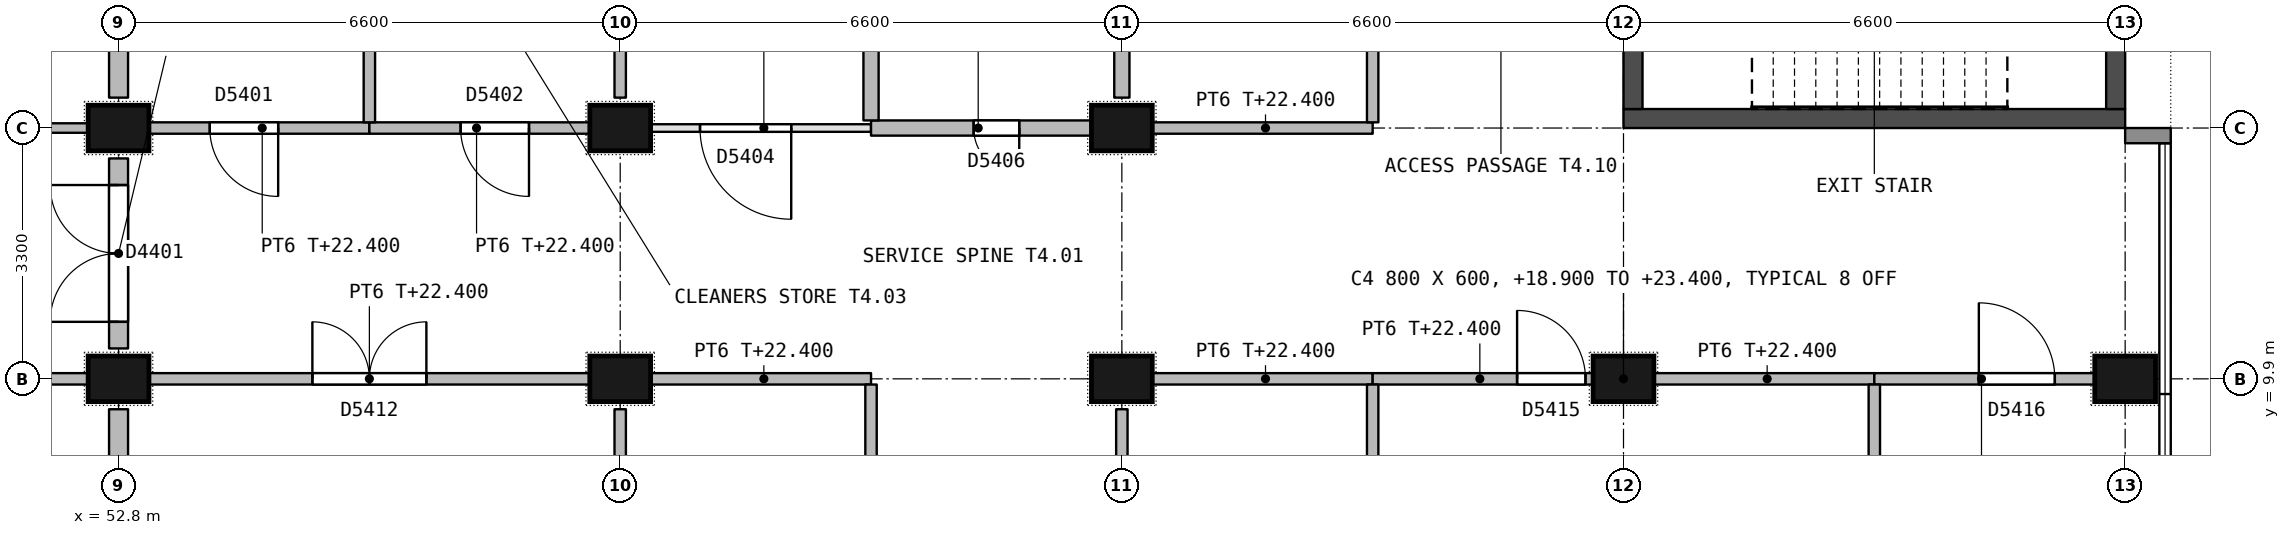
"""IFC4 building model, lengths in metres.
Left out: names, types, materials, properties, quantities, classifications, styles, units other than length and angle.
Written with IfcOpenShell. Run it as: python <this file> out.ifc"""

import sys

from ifc_helpers import new_model, si_unit, direction, frame, frame_2d, origin, origin_2d, place, context, subcontext, project, spatial, rectangle, extrude, element, fill, save


model = new_model("IFC4")
c1 = context("Model", 3, precision=1e-05, world=origin(), true_north=direction((0.0, 1.0)))
c2 = subcontext(c1, "Body", "Model", "MODEL_VIEW")
j1 = project(units=[si_unit("LENGTHUNIT", "METRE"), si_unit("PLANEANGLEUNIT", "RADIAN")], contexts=[c1])
p1 = place(None, origin())
s1 = spatial("IfcSite", under=j1, at=p1, CompositionType="ELEMENT")
p2 = place(p1, origin())
s2 = spatial("IfcBuilding", under=s1, at=p2, CompositionType="ELEMENT")
p3 = place(p2, frame((0.0, 0.0, 18.9)))
s3 = spatial("IfcBuildingStorey", under=s2, at=p3, CompositionType="ELEMENT", Elevation=18.9)
for number, where, z_axis, x_axis in (
    (1, (52.8, 9.9, 0.0), (0.0, 0.0, 1.0), (1.0, 0.0, 0.0)),
    (2, (52.8, 13.2, 0.0), (0.0, 0.0, 1.0), (1.0, 0.0, 0.0)),
    (3, (59.4, 9.9, 0.0), (0.0, 0.0, 1.0), (1.0, 0.0, 0.0)),
    (4, (59.4, 13.2, 0.0), (0.0, 0.0, 1.0), (1.0, 0.0, 0.0)),
    (5, (66.0, 9.9, 0.0), (0.0, 0.0, 1.0), (1.0, 0.0, 0.0)),
    (6, (66.0, 13.2, 0.0), (0.0, 0.0, 1.0), (1.0, 0.0, 0.0)),
    (7, (72.6, 9.9, 0.0), (0.0, 0.0, 1.0), (1.0, 0.0, 0.0)),
    (8, (79.2, 9.9, 0.0), (0.0, 0.0, 1.0), (1.0, 0.0, 0.0)),
):
    element("IfcColumn", number, at=place(p3, frame(where, z_axis=z_axis, x_axis=x_axis)), inside=s3, PredefinedType="COLUMN", context=c2, shape_type="SweptSolid", body=[
        extrude(rectangle(XDim=0.8, YDim=0.6, at=origin_2d()), origin(), (0.0, 0.0, 1.0), 4.5),
    ])
p4 = place(p3, frame((72.6, 13.325, 0.0), z_axis=(0.0, 0.0, 1.0), x_axis=(1.0, 0.0, 0.0)))
e9 = element("IfcWall", 9, at=p4, inside=s3, PredefinedType="SHEAR", context=c2, shape_type="SweptSolid", body=[
    extrude(rectangle(XDim=6.6, YDim=0.25, at=frame_2d((3.3, 0.0))), origin(), (0.0, 0.0, 1.0), 4.2),
])
p5 = place(p3, frame((72.725, 13.45, 0.0), z_axis=(0.0, 0.0, 1.0), x_axis=(0.0, 1.0, 0.0)))
e10 = element("IfcWall", 10, at=p5, inside=s3, PredefinedType="SHEAR", context=c2, shape_type="SweptSolid", body=[
    extrude(rectangle(XDim=9.4, YDim=0.25, at=frame_2d((4.7, 0.0))), origin(), (0.0, 0.0, 1.0), 4.2),
])
p6 = place(p5, frame((4.125, 0.0, 0.0)))
e11 = element("IfcOpeningElement", 11, at=p6, cuts=e10, PredefinedType="OPENING", context=c2, shape_type="SweptSolid", body=[
    extrude(rectangle(XDim=1.2, YDim=2.1, at=frame_2d((0.6, 1.05))), frame((0.0, 0.135, 0.0), z_axis=(0.0, -1.0, 0.0), x_axis=(1.0, 0.0, 0.0)), (0.0, 0.0, 1.0), 0.27),
])
p7 = place(p3, frame((79.075, 13.45, 0.0), z_axis=(0.0, 0.0, 1.0), x_axis=(0.0, 1.0, 0.0)))
e12 = element("IfcWall", 12, at=p7, inside=s3, PredefinedType="SHEAR", context=c2, shape_type="SweptSolid", body=[
    extrude(rectangle(XDim=9.4, YDim=0.25, at=frame_2d((4.7, 0.0))), origin(), (0.0, 0.0, 1.0), 4.2),
])
p8 = place(p7, frame((0.95, 0.0, 0.7)))
e13 = element("IfcOpeningElement", 13, at=p8, cuts=e12, PredefinedType="OPENING", context=c2, shape_type="SweptSolid", body=[
    extrude(rectangle(XDim=1.2, YDim=1.8, at=frame_2d((0.6, 0.9))), frame((0.0, 0.135, 0.0), z_axis=(0.0, -1.0, 0.0), x_axis=(1.0, 0.0, 0.0)), (0.0, 0.0, 1.0), 0.27),
])
p9 = place(p3, frame((79.2, 13.1, 0.0), z_axis=(0.0, 0.0, 1.0), x_axis=(1.0, 0.0, 0.0)))
e14 = element("IfcWall", 14, at=p9, inside=s3, PredefinedType="STANDARD", context=c2, shape_type="SweptSolid", body=[
    extrude(rectangle(XDim=0.6, YDim=0.2, at=frame_2d((0.3, 0.0))), origin(), (0.0, 0.0, 1.0), 3.5),
])
p10 = place(p3, frame((49.5, 13.2, 0.0), z_axis=(0.0, 0.0, 1.0), x_axis=(1.0, 0.0, 0.0)))
e15 = element("IfcWall", 15, at=p10, inside=s3, PredefinedType="PARTITIONING", context=c2, shape_type="SweptSolid", body=[
    extrude(rectangle(XDim=2.9, YDim=0.125, at=frame_2d((1.45, 0.0))), origin(), (0.0, 0.0, 1.0), 3.5),
])
p11 = place(p10, frame((1.2, 0.0, 0.0)))
e16 = element("IfcOpeningElement", 16, at=p11, cuts=e15, PredefinedType="OPENING", context=c2, shape_type="SweptSolid", body=[
    extrude(rectangle(XDim=0.9, YDim=2.1, at=frame_2d((0.45, 1.05))), frame((0.0, 0.073, 0.0), z_axis=(0.0, -1.0, 0.0), x_axis=(1.0, 0.0, 0.0)), (0.0, 0.0, 1.0), 0.145),
])
p12 = place(p3, frame((46.55, 9.9, 0.0), z_axis=(0.0, 0.0, 1.0), x_axis=(1.0, 0.0, 0.0)))
e17 = element("IfcWall", 17, at=p12, inside=s3, PredefinedType="PARTITIONING", context=c2, shape_type="SweptSolid", body=[
    extrude(rectangle(XDim=5.85, YDim=0.15, at=frame_2d((2.925, 0.0))), origin(), (0.0, 0.0, 1.0), 3.5),
])
p13 = place(p12, frame((2.2, 0.0, 0.0)))
e18 = element("IfcOpeningElement", 18, at=p13, cuts=e17, PredefinedType="OPENING", context=c2, shape_type="SweptSolid", body=[
    extrude(rectangle(XDim=1.5, YDim=2.1, at=frame_2d((0.75, 1.05))), frame((0.0, 0.085, 0.0), z_axis=(0.0, -1.0, 0.0), x_axis=(1.0, 0.0, 0.0)), (0.0, 0.0, 1.0), 0.17),
])
p14 = place(p3, frame((52.8, 10.3, 0.0), z_axis=(0.0, 0.0, 1.0), x_axis=(0.0, 1.0, 0.0)))
e19 = element("IfcWall", 19, at=p14, inside=s3, PredefinedType="PARTITIONING", context=c2, shape_type="SweptSolid", body=[
    extrude(rectangle(XDim=2.5, YDim=0.25, at=frame_2d((1.25, 0.0))), origin(), (0.0, 0.0, 1.0), 3.6),
])
p15 = place(p14, frame((0.35, 0.0, 0.0)))
e20 = element("IfcOpeningElement", 20, at=p15, cuts=e19, PredefinedType="OPENING", context=c2, shape_type="SweptSolid", body=[
    extrude(rectangle(XDim=1.8, YDim=2.1, at=frame_2d((0.9, 1.05))), frame((0.0, 0.135, 0.0), z_axis=(0.0, -1.0, 0.0), x_axis=(1.0, 0.0, 0.0)), (0.0, 0.0, 1.0), 0.27),
])
p16 = place(p3, frame((52.8, 13.6, 0.0), z_axis=(0.0, 0.0, 1.0), x_axis=(0.0, 1.0, 0.0)))
e21 = element("IfcWall", 21, at=p16, inside=s3, PredefinedType="PARTITIONING", context=c2, shape_type="SweptSolid", body=[
    extrude(rectangle(XDim=9.1, YDim=0.25, at=frame_2d((4.55, 0.0))), origin(), (0.0, 0.0, 1.0), 3.3),
])
p17 = place(p3, frame((52.8, 3.9, 0.0), z_axis=(0.0, 0.0, 1.0), x_axis=(0.0, 1.0, 0.0)))
e22 = element("IfcWall", 22, at=p17, inside=s3, PredefinedType="PARTITIONING", context=c2, shape_type="SweptSolid", body=[
    extrude(rectangle(XDim=5.6, YDim=0.25, at=frame_2d((2.8, 0.0))), origin(), (0.0, 0.0, 1.0), 3.3),
])
p18 = place(p3, frame((56.1, 13.2, 0.0), z_axis=(0.0, 0.0, 1.0), x_axis=(-1.0, 0.0, 0.0)))
e23 = element("IfcWall", 23, at=p18, inside=s3, PredefinedType="PARTITIONING", context=c2, shape_type="SweptSolid", body=[
    extrude(rectangle(XDim=2.9, YDim=0.15, at=frame_2d((1.45, 0.0))), origin(), (0.0, 0.0, 1.0), 3.5),
])
p19 = place(p18, frame((1.2, 0.0, 0.0)))
e24 = element("IfcOpeningElement", 24, at=p19, cuts=e23, PredefinedType="OPENING", context=c2, shape_type="SweptSolid", body=[
    extrude(rectangle(XDim=0.9, YDim=2.1, at=frame_2d((0.45, 1.05))), frame((0.0, 0.085, 0.0), z_axis=(0.0, -1.0, 0.0), x_axis=(1.0, 0.0, 0.0)), (0.0, 0.0, 1.0), 0.17),
])
p20 = place(p3, frame((59.0, 13.2, 0.0), z_axis=(0.0, 0.0, 1.0), x_axis=(-1.0, 0.0, 0.0)))
e25 = element("IfcWall", 25, at=p20, inside=s3, PredefinedType="PARTITIONING", context=c2, shape_type="SweptSolid", body=[
    extrude(rectangle(XDim=2.9, YDim=0.15, at=frame_2d((1.45, 0.0))), origin(), (0.0, 0.0, 1.0), 3.5),
])
p21 = place(p20, frame((0.8, 0.0, 0.0)))
e26 = element("IfcOpeningElement", 26, at=p21, cuts=e25, PredefinedType="OPENING", context=c2, shape_type="SweptSolid", body=[
    extrude(rectangle(XDim=0.9, YDim=2.1, at=frame_2d((0.45, 1.05))), frame((0.0, 0.085, 0.0), z_axis=(0.0, -1.0, 0.0), x_axis=(1.0, 0.0, 0.0)), (0.0, 0.0, 1.0), 0.17),
])
p22 = place(p3, frame((59.8, 13.2, 0.0), z_axis=(0.0, 0.0, 1.0), x_axis=(1.0, 0.0, 0.0)))
e27 = element("IfcWall", 27, at=p22, inside=s3, PredefinedType="PARTITIONING", context=c2, shape_type="SweptSolid", body=[
    extrude(rectangle(XDim=2.9, YDim=0.1, at=frame_2d((1.45, 0.0))), origin(), (0.0, 0.0, 1.0), 3.5),
])
p23 = place(p22, frame((0.65, 0.0, 0.0)))
e28 = element("IfcOpeningElement", 28, at=p23, cuts=e27, PredefinedType="OPENING", context=c2, shape_type="SweptSolid", body=[
    extrude(rectangle(XDim=1.2, YDim=2.1, at=frame_2d((0.6, 1.05))), frame((0.0, 0.06, 0.0), z_axis=(0.0, -1.0, 0.0), x_axis=(1.0, 0.0, 0.0)), (0.0, 0.0, 1.0), 0.12),
])
p24 = place(p3, frame((62.7, 13.2, 0.0), z_axis=(0.0, 0.0, 1.0), x_axis=(1.0, 0.0, 0.0)))
e29 = element("IfcWall", 29, at=p24, inside=s3, PredefinedType="PARTITIONING", context=c2, shape_type="SweptSolid", body=[
    extrude(rectangle(XDim=2.9, YDim=0.2, at=frame_2d((1.45, 0.0))), origin(), (0.0, 0.0, 1.0), 3.5),
])
p25 = place(p24, frame((1.35, 0.0, 0.0)))
e30 = element("IfcOpeningElement", 30, at=p25, cuts=e29, PredefinedType="OPENING", context=c2, shape_type="SweptSolid", body=[
    extrude(rectangle(XDim=0.6, YDim=2.1, at=frame_2d((0.3, 1.05))), frame((0.0, 0.11, 0.0), z_axis=(0.0, -1.0, 0.0), x_axis=(1.0, 0.0, 0.0)), (0.0, 0.0, 1.0), 0.22),
])
p26 = place(p3, frame((69.3, 13.2, 0.0), z_axis=(0.0, 0.0, 1.0), x_axis=(-1.0, 0.0, 0.0)))
e31 = element("IfcWall", 31, at=p26, inside=s3, PredefinedType="PARTITIONING", context=c2, shape_type="SweptSolid", body=[
    extrude(rectangle(XDim=2.9, YDim=0.15, at=frame_2d((1.45, 0.0))), origin(), (0.0, 0.0, 1.0), 3.5),
])
p27 = place(p3, frame((53.2, 9.9, 0.0), z_axis=(0.0, 0.0, 1.0), x_axis=(1.0, 0.0, 0.0)))
e32 = element("IfcWall", 32, at=p27, inside=s3, PredefinedType="PARTITIONING", context=c2, shape_type="SweptSolid", body=[
    extrude(rectangle(XDim=5.8, YDim=0.15, at=frame_2d((2.9, 0.0))), origin(), (0.0, 0.0, 1.0), 3.5),
])
p28 = place(p27, frame((2.15, 0.0, 0.0)))
e33 = element("IfcOpeningElement", 33, at=p28, cuts=e32, PredefinedType="OPENING", context=c2, shape_type="SweptSolid", body=[
    extrude(rectangle(XDim=1.5, YDim=2.1, at=frame_2d((0.75, 1.05))), frame((0.0, 0.085, 0.0), z_axis=(0.0, -1.0, 0.0), x_axis=(1.0, 0.0, 0.0)), (0.0, 0.0, 1.0), 0.17),
])
p29 = place(p3, frame((59.8, 9.9, 0.0), z_axis=(0.0, 0.0, 1.0), x_axis=(1.0, 0.0, 0.0)))
e34 = element("IfcWall", 34, at=p29, inside=s3, PredefinedType="PARTITIONING", context=c2, shape_type="SweptSolid", body=[
    extrude(rectangle(XDim=2.9, YDim=0.15, at=frame_2d((1.45, 0.0))), origin(), (0.0, 0.0, 1.0), 3.5),
])
p30 = place(p3, frame((66.4, 9.9, 0.0), z_axis=(0.0, 0.0, 1.0), x_axis=(1.0, 0.0, 0.0)))
e35 = element("IfcWall", 35, at=p30, inside=s3, PredefinedType="PARTITIONING", context=c2, shape_type="SweptSolid", body=[
    extrude(rectangle(XDim=2.9, YDim=0.15, at=frame_2d((1.45, 0.0))), origin(), (0.0, 0.0, 1.0), 3.5),
])
p31 = place(p3, frame((69.3, 9.9, 0.0), z_axis=(0.0, 0.0, 1.0), x_axis=(1.0, 0.0, 0.0)))
e36 = element("IfcWall", 36, at=p31, inside=s3, PredefinedType="PARTITIONING", context=c2, shape_type="SweptSolid", body=[
    extrude(rectangle(XDim=2.9, YDim=0.15, at=frame_2d((1.45, 0.0))), origin(), (0.0, 0.0, 1.0), 3.5),
])
p32 = place(p31, frame((1.9, 0.0, 0.0)))
e37 = element("IfcOpeningElement", 37, at=p32, cuts=e36, PredefinedType="OPENING", context=c2, shape_type="SweptSolid", body=[
    extrude(rectangle(XDim=0.9, YDim=2.1, at=frame_2d((0.45, 1.05))), frame((0.0, 0.085, 0.0), z_axis=(0.0, -1.0, 0.0), x_axis=(1.0, 0.0, 0.0)), (0.0, 0.0, 1.0), 0.17),
])
p33 = place(p3, frame((73.0, 9.9, 0.0), z_axis=(0.0, 0.0, 1.0), x_axis=(1.0, 0.0, 0.0)))
e38 = element("IfcWall", 38, at=p33, inside=s3, PredefinedType="PARTITIONING", context=c2, shape_type="SweptSolid", body=[
    extrude(rectangle(XDim=2.9, YDim=0.15, at=frame_2d((1.45, 0.0))), origin(), (0.0, 0.0, 1.0), 3.5),
])
p34 = place(p3, frame((75.9, 9.9, 0.0), z_axis=(0.0, 0.0, 1.0), x_axis=(1.0, 0.0, 0.0)))
e39 = element("IfcWall", 39, at=p34, inside=s3, PredefinedType="PARTITIONING", context=c2, shape_type="SweptSolid", body=[
    extrude(rectangle(XDim=2.9, YDim=0.15, at=frame_2d((1.45, 0.0))), origin(), (0.0, 0.0, 1.0), 3.5),
])
p35 = place(p34, frame((1.375, 0.0, 0.0)))
e40 = element("IfcOpeningElement", 40, at=p35, cuts=e39, PredefinedType="OPENING", context=c2, shape_type="SweptSolid", body=[
    extrude(rectangle(XDim=1.0, YDim=2.1, at=frame_2d((0.5, 1.05))), frame((0.0, 0.085, 0.0), z_axis=(0.0, -1.0, 0.0), x_axis=(1.0, 0.0, 0.0)), (0.0, 0.0, 1.0), 0.17),
])
p36 = place(p3, frame((56.1, 13.275, 0.0), z_axis=(0.0, 0.0, 1.0), x_axis=(0.0, 1.0, 0.0)))
e41 = element("IfcWall", 41, at=p36, inside=s3, PredefinedType="PARTITIONING", context=c2, shape_type="SweptSolid", body=[
    extrude(rectangle(XDim=3.225, YDim=0.15, at=frame_2d((1.613, 0.0))), origin(), (0.0, 0.0, 1.0), 4.2),
])
p37 = place(p3, frame((59.4, 13.6, 0.0), z_axis=(0.0, 0.0, 1.0), x_axis=(0.0, 1.0, 0.0)))
e42 = element("IfcWall", 42, at=p37, inside=s3, PredefinedType="PARTITIONING", context=c2, shape_type="SweptSolid", body=[
    extrude(rectangle(XDim=2.825, YDim=0.15, at=frame_2d((1.413, 0.0))), origin(), (0.0, 0.0, 1.0), 3.3),
])
p38 = place(p3, frame((62.7, 13.3, 0.0), z_axis=(0.0, 0.0, 1.0), x_axis=(0.0, 1.0, 0.0)))
e43 = element("IfcWall", 43, at=p38, inside=s3, PredefinedType="PARTITIONING", context=c2, shape_type="SweptSolid", body=[
    extrude(rectangle(XDim=3.2, YDim=0.2, at=frame_2d((1.6, 0.0))), origin(), (0.0, 0.0, 1.0), 4.2),
])
p39 = place(p3, frame((66.0, 13.6, 0.0), z_axis=(0.0, 0.0, 1.0), x_axis=(0.0, 1.0, 0.0)))
e44 = element("IfcWall", 44, at=p39, inside=s3, PredefinedType="PARTITIONING", context=c2, shape_type="SweptSolid", body=[
    extrude(rectangle(XDim=2.8, YDim=0.2, at=frame_2d((1.4, 0.0))), origin(), (0.0, 0.0, 1.0), 3.3),
])
p40 = place(p3, frame((69.3, 23.55, 0.0), z_axis=(0.0, 0.0, 1.0), x_axis=(0.0, -1.0, 0.0)))
e45 = element("IfcWall", 45, at=p40, inside=s3, PredefinedType="PARTITIONING", context=c2, shape_type="SweptSolid", body=[
    extrude(rectangle(XDim=10.275, YDim=0.15, at=frame_2d((5.138, 0.0))), origin(), (0.0, 0.0, 1.0), 4.2),
])
p41 = place(p40, frame((4.275, 0.0, 0.0)))
e46 = element("IfcOpeningElement", 46, at=p41, cuts=e45, PredefinedType="OPENING", context=c2, shape_type="SweptSolid", body=[
    extrude(rectangle(XDim=1.8, YDim=2.4, at=frame_2d((0.9, 1.2))), frame((0.0, 0.085, 0.0), z_axis=(0.0, -1.0, 0.0), x_axis=(1.0, 0.0, 0.0)), (0.0, 0.0, 1.0), 0.17),
])
p42 = place(p3, frame((59.4, 3.975, 0.0), z_axis=(0.0, 0.0, 1.0), x_axis=(0.0, 1.0, 0.0)))
e47 = element("IfcWall", 47, at=p42, inside=s3, PredefinedType="PARTITIONING", context=c2, shape_type="SweptSolid", body=[
    extrude(rectangle(XDim=5.525, YDim=0.15, at=frame_2d((2.762, 0.0))), origin(), (0.0, 0.0, 1.0), 3.3),
])
p43 = place(p3, frame((62.7, 9.825, 0.0), z_axis=(0.0, 0.0, 1.0), x_axis=(0.0, -1.0, 0.0)))
e48 = element("IfcWall", 48, at=p43, inside=s3, PredefinedType="PARTITIONING", context=c2, shape_type="SweptSolid", body=[
    extrude(rectangle(XDim=5.85, YDim=0.15, at=frame_2d((2.925, 0.0))), origin(), (0.0, 0.0, 1.0), 4.2),
])
p44 = place(p43, frame((2.425, 0.0, 0.0)))
e49 = element("IfcOpeningElement", 49, at=p44, cuts=e48, PredefinedType="OPENING", context=c2, shape_type="SweptSolid", body=[
    extrude(rectangle(XDim=1.0, YDim=2.1, at=frame_2d((0.5, 1.05))), frame((0.0, 0.085, 0.0), z_axis=(0.0, -1.0, 0.0), x_axis=(1.0, 0.0, 0.0)), (0.0, 0.0, 1.0), 0.17),
])
p45 = place(p3, frame((66.0, 3.975, 0.0), z_axis=(0.0, 0.0, 1.0), x_axis=(0.0, 1.0, 0.0)))
e50 = element("IfcWall", 50, at=p45, inside=s3, PredefinedType="PARTITIONING", context=c2, shape_type="SweptSolid", body=[
    extrude(rectangle(XDim=5.525, YDim=0.15, at=frame_2d((2.762, 0.0))), origin(), (0.0, 0.0, 1.0), 3.3),
])
p46 = place(p45, frame((2.425, 0.0, 0.0)))
e51 = element("IfcOpeningElement", 51, at=p46, cuts=e50, PredefinedType="OPENING", context=c2, shape_type="SweptSolid", body=[
    extrude(rectangle(XDim=1.0, YDim=2.1, at=frame_2d((0.5, 1.05))), frame((0.0, 0.085, 0.0), z_axis=(0.0, -1.0, 0.0), x_axis=(1.0, 0.0, 0.0)), (0.0, 0.0, 1.0), 0.17),
])
for number, where, z_axis, x_axis in (
    (52, (69.3, 3.975, 0.0), (0.0, 0.0, 1.0), (0.0, 1.0, 0.0)),
    (53, (75.9, 3.975, 0.0), (0.0, 0.0, 1.0), (0.0, 1.0, 0.0)),
):
    element("IfcWall", number, at=place(p3, frame(where, z_axis=z_axis, x_axis=x_axis)), inside=s3, PredefinedType="PARTITIONING", context=c2, shape_type="SweptSolid", body=[
        extrude(rectangle(XDim=5.85, YDim=0.15, at=frame_2d((2.925, 0.0))), origin(), (0.0, 0.0, 1.0), 4.2),
    ])
p47 = place(p15, origin())
e54 = element("IfcDoor", 54, at=p47, inside=s3, OperationType="DOUBLE_DOOR_SINGLE_SWING", PredefinedType="DOOR", context=c2, shape_type="SweptSolid", body=[
    extrude(rectangle(XDim=1.8, YDim=2.1, at=frame_2d((0.9, 1.05))), frame((0.0, 0.03, 0.0), z_axis=(0.0, -1.0, 0.0), x_axis=(1.0, 0.0, 0.0)), (0.0, 0.0, 1.0), 0.06),
])
fill(e20, e54)
p48 = place(p19, origin())
e55 = element("IfcDoor", 55, at=p48, inside=s3, OperationType="SINGLE_SWING_LEFT", PredefinedType="DOOR", context=c2, shape_type="SweptSolid", body=[
    extrude(rectangle(XDim=0.9, YDim=2.1, at=frame_2d((0.45, 1.05))), frame((0.0, 0.03, 0.0), z_axis=(0.0, -1.0, 0.0), x_axis=(1.0, 0.0, 0.0)), (0.0, 0.0, 1.0), 0.06),
])
fill(e24, e55)
p49 = place(p21, origin())
e56 = element("IfcDoor", 56, at=p49, inside=s3, OperationType="SINGLE_SWING_LEFT", PredefinedType="DOOR", context=c2, shape_type="SweptSolid", body=[
    extrude(rectangle(XDim=0.9, YDim=2.1, at=frame_2d((0.45, 1.05))), frame((0.0, 0.027, 0.0), z_axis=(0.0, -1.0, 0.0), x_axis=(1.0, 0.0, 0.0)), (0.0, 0.0, 1.0), 0.054),
])
fill(e26, e56)
p50 = place(p23, origin())
e57 = element("IfcDoor", 57, at=p50, inside=s3, OperationType="SINGLE_SWING_RIGHT", PredefinedType="DOOR", context=c2, shape_type="SweptSolid", body=[
    extrude(rectangle(XDim=1.2, YDim=2.1, at=frame_2d((0.6, 1.05))), frame((0.0, 0.022, 0.0), z_axis=(0.0, -1.0, 0.0), x_axis=(1.0, 0.0, 0.0)), (0.0, 0.0, 1.0), 0.044),
])
fill(e28, e57)
p51 = place(p25, origin())
e58 = element("IfcDoor", 58, at=p51, inside=s3, OperationType="SINGLE_SWING_RIGHT", PredefinedType="DOOR", context=c2, shape_type="SweptSolid", body=[
    extrude(rectangle(XDim=0.6, YDim=2.1, at=frame_2d((0.3, 1.05))), frame((0.0, 0.03, 0.0), z_axis=(0.0, -1.0, 0.0), x_axis=(1.0, 0.0, 0.0)), (0.0, 0.0, 1.0), 0.06),
])
fill(e30, e58)
p52 = place(p28, origin())
e59 = element("IfcDoor", 59, at=p52, inside=s3, OperationType="DOUBLE_DOOR_SINGLE_SWING", PredefinedType="DOOR", context=c2, shape_type="SweptSolid", body=[
    extrude(rectangle(XDim=1.5, YDim=2.1, at=frame_2d((0.75, 1.05))), frame((0.0, 0.027, 0.0), z_axis=(0.0, -1.0, 0.0), x_axis=(1.0, 0.0, 0.0)), (0.0, 0.0, 1.0), 0.054),
])
fill(e33, e59)
p53 = place(p32, origin())
e60 = element("IfcDoor", 60, at=p53, inside=s3, OperationType="SINGLE_SWING_LEFT", PredefinedType="DOOR", context=c2, shape_type="SweptSolid", body=[
    extrude(rectangle(XDim=0.9, YDim=2.1, at=frame_2d((0.45, 1.05))), frame((0.0, 0.03, 0.0), z_axis=(0.0, -1.0, 0.0), x_axis=(1.0, 0.0, 0.0)), (0.0, 0.0, 1.0), 0.06),
])
fill(e37, e60)
p54 = place(p35, origin())
e61 = element("IfcDoor", 61, at=p54, inside=s3, OperationType="SINGLE_SWING_LEFT", PredefinedType="DOOR", context=c2, shape_type="SweptSolid", body=[
    extrude(rectangle(XDim=1.0, YDim=2.1, at=frame_2d((0.5, 1.05))), frame((0.0, 0.027, 0.0), z_axis=(0.0, -1.0, 0.0), x_axis=(1.0, 0.0, 0.0)), (0.0, 0.0, 1.0), 0.054),
])
fill(e40, e61)
save(model, sys.argv[1])
